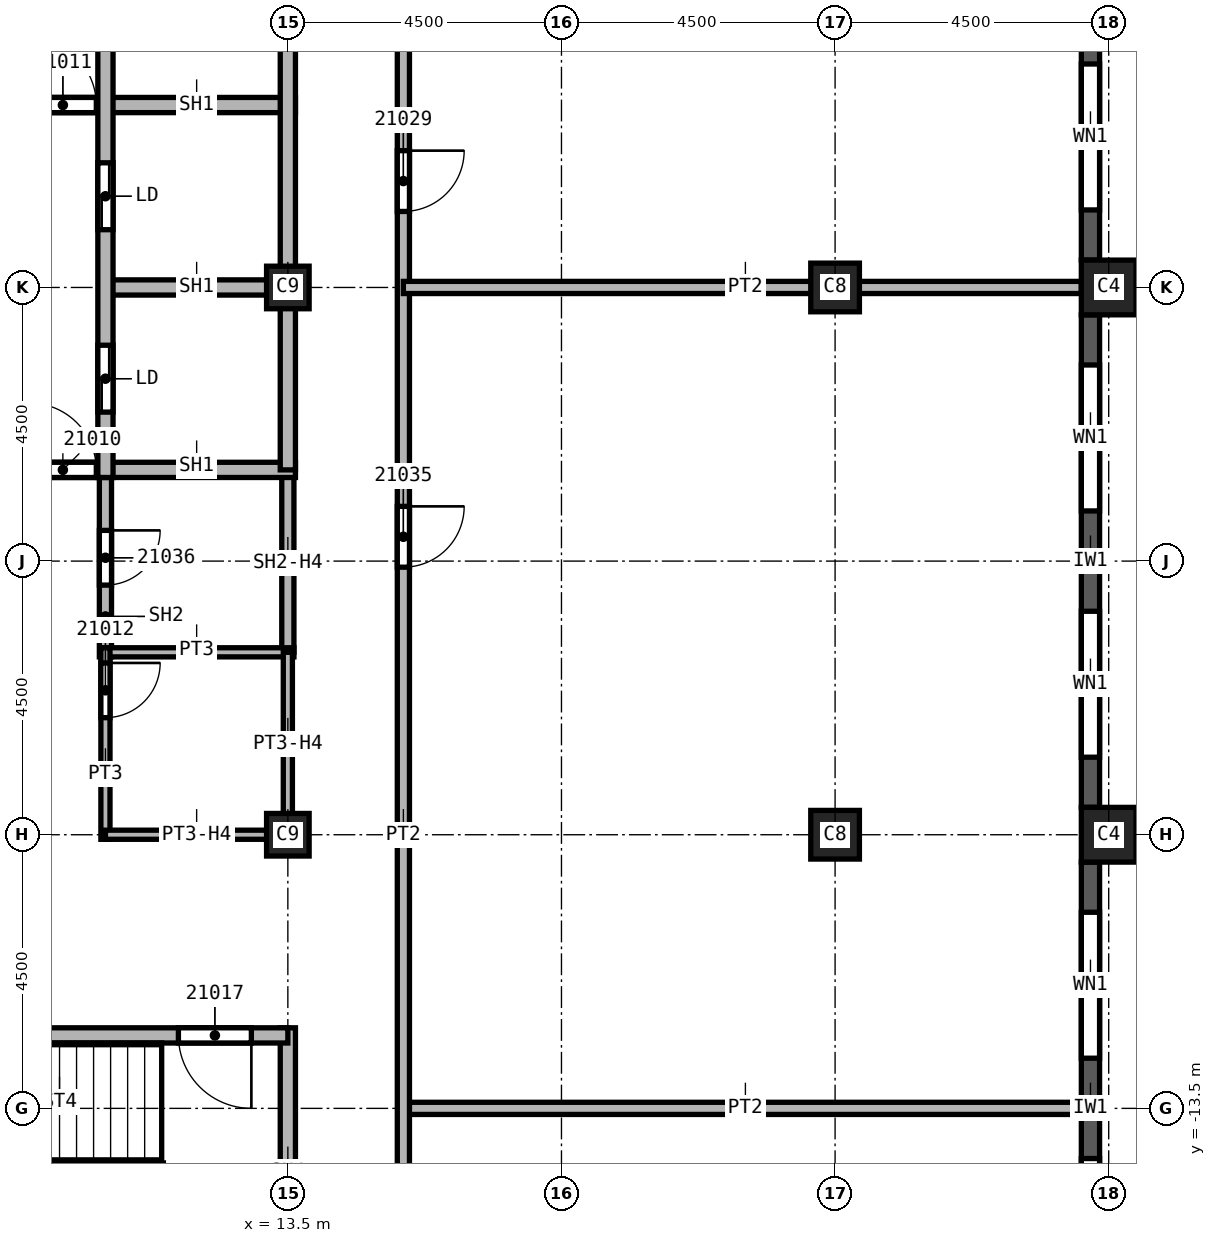
"""IFC4 building model, lengths in metres.
Left out: names, types, materials, properties, quantities, classifications, styles, units other than length and angle.
Written with IfcOpenShell. Run it as: python <this file> out.ifc"""

import sys

from ifc_helpers import new_model, si_unit, direction, frame, frame_2d, origin, origin_2d, place, context, subcontext, project, spatial, rectangle, extrude, element, fill, save


model = new_model("IFC4")
c1 = context("Model", 3, precision=1e-05, world=origin(), true_north=direction((0.0, 1.0)))
c2 = subcontext(c1, "Body", "Model", "MODEL_VIEW")
j1 = project(units=[si_unit("LENGTHUNIT", "METRE"), si_unit("PLANEANGLEUNIT", "RADIAN")], contexts=[c1])
p1 = place(None, origin())
s1 = spatial("IfcSite", under=j1, at=p1, CompositionType="ELEMENT")
p2 = place(p1, origin())
s2 = spatial("IfcBuilding", under=s1, at=p2, CompositionType="ELEMENT")
p3 = place(p2, frame((0.0, 0.0, 304.0)))
s3 = spatial("IfcBuildingStorey", under=s2, at=p3, CompositionType="ELEMENT", Elevation=304.0)
for number, where, z_axis, x_axis in (
    (1, (22.5, 0.0, 0.0), (0.0, 0.0, 1.0), (1.0, 0.0, 0.0)),
    (2, (22.5, -9.0, 0.0), (0.0, 0.0, 1.0), (1.0, 0.0, 0.0)),
):
    element("IfcColumn", number, at=place(p3, frame(where, z_axis=z_axis, x_axis=x_axis)), inside=s3, PredefinedType="COLUMN", context=c2, shape_type="SweptSolid", body=[
        extrude(rectangle(XDim=0.8, YDim=0.8, at=origin_2d()), origin(), (0.0, 0.0, 1.0), 3.74),
    ])
for number, where, z_axis, x_axis in (
    (3, (13.5, 0.0, 0.0), (0.0, 0.0, 1.0), (1.0, 0.0, 0.0)),
    (4, (13.5, -9.0, 0.0), (0.0, 0.0, 1.0), (1.0, 0.0, 0.0)),
):
    element("IfcColumn", number, at=place(p3, frame(where, z_axis=z_axis, x_axis=x_axis)), inside=s3, PredefinedType="COLUMN", context=c2, shape_type="SweptSolid", body=[
        extrude(rectangle(XDim=0.7, YDim=0.7, at=origin_2d()), origin(), (0.0, 0.0, 1.0), 3.74),
    ])
for number, where, z_axis, x_axis in (
    (5, (27.0, 0.0, 0.0), (0.0, 0.0, 1.0), (0.0, 1.0, 0.0)),
    (6, (27.0, -9.0, 0.0), (0.0, 0.0, 1.0), (0.0, 1.0, 0.0)),
):
    element("IfcColumn", number, at=place(p3, frame(where, z_axis=z_axis, x_axis=x_axis)), inside=s3, PredefinedType="COLUMN", context=c2, shape_type="SweptSolid", body=[
        extrude(rectangle(XDim=0.9, YDim=0.9, at=origin_2d()), origin(), (0.0, 0.0, 1.0), 3.74),
    ])
p4 = place(p3, frame((26.7, -17.55, 0.0), z_axis=(0.0, 0.0, 1.0), x_axis=(0.0, 1.0, 0.0)))
e7 = element("IfcWall", 7, at=p4, inside=s3, PredefinedType="SOLIDWALL", context=c2, shape_type="SweptSolid", body=[
    extrude(rectangle(XDim=8.1, YDim=0.3, at=frame_2d((4.05, 0.0))), origin(), (0.0, 0.0, 1.0), 3.14),
])
p5 = place(p4, frame((0.825, 0.0, 0.8)))
e8 = element("IfcOpeningElement", 8, at=p5, cuts=e7, PredefinedType="OPENING", context=c2, shape_type="SweptSolid", body=[
    extrude(rectangle(XDim=2.4, YDim=1.95, at=frame_2d((1.2, 0.975))), frame((0.0, 0.15, 0.0), z_axis=(0.0, -1.0, 0.0), x_axis=(1.0, 0.0, 0.0)), (0.0, 0.0, 1.0), 0.3),
])
p6 = place(p4, frame((4.875, 0.0, 0.8)))
e9 = element("IfcOpeningElement", 9, at=p6, cuts=e7, PredefinedType="OPENING", context=c2, shape_type="SweptSolid", body=[
    extrude(rectangle(XDim=2.4, YDim=1.95, at=frame_2d((1.2, 0.975))), frame((0.0, 0.15, 0.0), z_axis=(0.0, -1.0, 0.0), x_axis=(1.0, 0.0, 0.0)), (0.0, 0.0, 1.0), 0.3),
])
p7 = place(p3, frame((26.7, -8.55, 0.0), z_axis=(0.0, 0.0, 1.0), x_axis=(0.0, 1.0, 0.0)))
e10 = element("IfcWall", 10, at=p7, inside=s3, PredefinedType="SOLIDWALL", context=c2, shape_type="SweptSolid", body=[
    extrude(rectangle(XDim=8.1, YDim=0.3, at=frame_2d((4.05, 0.0))), origin(), (0.0, 0.0, 1.0), 3.14),
])
p8 = place(p7, frame((0.825, 0.0, 0.8)))
e11 = element("IfcOpeningElement", 11, at=p8, cuts=e10, PredefinedType="OPENING", context=c2, shape_type="SweptSolid", body=[
    extrude(rectangle(XDim=2.4, YDim=1.95, at=frame_2d((1.2, 0.975))), frame((0.0, 0.15, 0.0), z_axis=(0.0, -1.0, 0.0), x_axis=(1.0, 0.0, 0.0)), (0.0, 0.0, 1.0), 0.3),
])
p9 = place(p7, frame((4.875, 0.0, 0.8)))
e12 = element("IfcOpeningElement", 12, at=p9, cuts=e10, PredefinedType="OPENING", context=c2, shape_type="SweptSolid", body=[
    extrude(rectangle(XDim=2.4, YDim=1.95, at=frame_2d((1.2, 0.975))), frame((0.0, 0.15, 0.0), z_axis=(0.0, -1.0, 0.0), x_axis=(1.0, 0.0, 0.0)), (0.0, 0.0, 1.0), 0.3),
])
p10 = place(p3, frame((26.7, 0.45, 0.0), z_axis=(0.0, 0.0, 1.0), x_axis=(0.0, 1.0, 0.0)))
e13 = element("IfcWall", 13, at=p10, inside=s3, PredefinedType="SOLIDWALL", context=c2, shape_type="SweptSolid", body=[
    extrude(rectangle(XDim=8.1, YDim=0.3, at=frame_2d((4.05, 0.0))), origin(), (0.0, 0.0, 1.0), 3.14),
])
p11 = place(p10, frame((0.825, 0.0, 0.8)))
e14 = element("IfcOpeningElement", 14, at=p11, cuts=e13, PredefinedType="OPENING", context=c2, shape_type="SweptSolid", body=[
    extrude(rectangle(XDim=2.4, YDim=1.95, at=frame_2d((1.2, 0.975))), frame((0.0, 0.15, 0.0), z_axis=(0.0, -1.0, 0.0), x_axis=(1.0, 0.0, 0.0)), (0.0, 0.0, 1.0), 0.3),
])
p12 = place(p10, frame((4.875, 0.0, 0.8)))
e15 = element("IfcOpeningElement", 15, at=p12, cuts=e13, PredefinedType="OPENING", context=c2, shape_type="SweptSolid", body=[
    extrude(rectangle(XDim=2.4, YDim=1.95, at=frame_2d((1.2, 0.975))), frame((0.0, 0.15, 0.0), z_axis=(0.0, -1.0, 0.0), x_axis=(1.0, 0.0, 0.0)), (0.0, 0.0, 1.0), 0.3),
])
p13 = place(p3, frame((15.4, -13.5, 0.0), z_axis=(0.0, 0.0, 1.0), x_axis=(1.0, 0.0, 0.0)))
e16 = element("IfcWall", 16, at=p13, inside=s3, PredefinedType="PARTITIONING", context=c2, shape_type="SweptSolid", body=[
    extrude(rectangle(XDim=11.15, YDim=0.2, at=frame_2d((5.575, 0.0))), origin(), (0.0, 0.0, 1.0), 3.74),
])
p14 = place(p3, frame((15.4, 22.95, 0.0), z_axis=(0.0, 0.0, 1.0), x_axis=(0.0, -1.0, 0.0)))
e17 = element("IfcWall", 17, at=p14, inside=s3, PredefinedType="PARTITIONING", context=c2, shape_type="SweptSolid", body=[
    extrude(rectangle(XDim=45.9, YDim=0.2, at=frame_2d((22.95, 0.0))), origin(), (0.0, 0.0, 1.0), 3.74),
])
p15 = place(p14, frame((20.7, 0.0, 0.0)))
e18 = element("IfcOpeningElement", 18, at=p15, cuts=e17, PredefinedType="OPENING", context=c2, shape_type="SweptSolid", body=[
    extrude(rectangle(XDim=1.0, YDim=2.1, at=frame_2d((0.5, 1.05))), frame((0.0, 0.1, 0.0), z_axis=(0.0, -1.0, 0.0), x_axis=(1.0, 0.0, 0.0)), (0.0, 0.0, 1.0), 0.2),
])
p16 = place(p14, frame((11.85, 0.0, 0.0)))
e19 = element("IfcOpeningElement", 19, at=p16, cuts=e17, PredefinedType="OPENING", context=c2, shape_type="SweptSolid", body=[
    extrude(rectangle(XDim=1.0, YDim=2.1, at=frame_2d((0.5, 1.05))), frame((0.0, 0.1, 0.0), z_axis=(0.0, -1.0, 0.0), x_axis=(1.0, 0.0, 0.0)), (0.0, 0.0, 1.0), 0.2),
])
p17 = place(p14, frame((4.725, 0.0, 0.0)))
e20 = element("IfcOpeningElement", 20, at=p17, cuts=e17, PredefinedType="OPENING", context=c2, shape_type="SweptSolid", body=[
    extrude(rectangle(XDim=1.0, YDim=2.1, at=frame_2d((0.5, 1.05))), frame((0.0, 0.1, 0.0), z_axis=(0.0, -1.0, 0.0), x_axis=(1.0, 0.0, 0.0)), (0.0, 0.0, 1.0), 0.2),
])
p18 = place(p14, frame((0.4, 0.0, 0.0)))
e21 = element("IfcOpeningElement", 21, at=p18, cuts=e17, PredefinedType="OPENING", context=c2, shape_type="SweptSolid", body=[
    extrude(rectangle(XDim=1.0, YDim=2.1, at=frame_2d((0.5, 1.05))), frame((0.0, 0.1, 0.0), z_axis=(0.0, -1.0, 0.0), x_axis=(1.0, 0.0, 0.0)), (0.0, 0.0, 1.0), 0.2),
])
p19 = place(p14, frame((38.85, 0.0, 0.0)))
e22 = element("IfcOpeningElement", 22, at=p19, cuts=e17, PredefinedType="OPENING", context=c2, shape_type="SweptSolid", body=[
    extrude(rectangle(XDim=1.0, YDim=2.1, at=frame_2d((0.5, 1.05))), frame((0.0, 0.1, 0.0), z_axis=(0.0, -1.0, 0.0), x_axis=(1.0, 0.0, 0.0)), (0.0, 0.0, 1.0), 0.2),
])
p20 = place(p14, frame((26.55, 0.0, 0.0)))
e23 = element("IfcOpeningElement", 23, at=p20, cuts=e17, PredefinedType="OPENING", context=c2, shape_type="SweptSolid", body=[
    extrude(rectangle(XDim=1.0, YDim=2.1, at=frame_2d((0.5, 1.05))), frame((0.0, 0.1, 0.0), z_axis=(0.0, -1.0, 0.0), x_axis=(1.0, 0.0, 0.0)), (0.0, 0.0, 1.0), 0.2),
])
p21 = place(p3, frame((26.55, 0.0, 0.0), z_axis=(0.0, 0.0, 1.0), x_axis=(-1.0, 0.0, 0.0)))
e24 = element("IfcWall", 24, at=p21, inside=s3, PredefinedType="PARTITIONING", context=c2, shape_type="SweptSolid", body=[
    extrude(rectangle(XDim=11.15, YDim=0.2, at=frame_2d((5.575, 0.0))), origin(), (0.0, 0.0, 1.0), 3.74),
])
p22 = place(p3, frame((10.5, -2.875, 0.0), z_axis=(0.0, 0.0, 1.0), x_axis=(0.0, -1.0, 0.0)))
e25 = element("IfcWall", 25, at=p22, inside=s3, PredefinedType="SOLIDWALL", context=c2, shape_type="SweptSolid", body=[
    extrude(rectangle(XDim=3.2, YDim=0.2, at=frame_2d((1.6, 0.0))), origin(), (0.0, 0.0, 1.0), 3.74),
])
p23 = place(p22, frame((1.12, 0.0, 0.0)))
e26 = element("IfcOpeningElement", 26, at=p23, cuts=e25, PredefinedType="OPENING", context=c2, shape_type="SweptSolid", body=[
    extrude(rectangle(XDim=0.9, YDim=2.1, at=frame_2d((0.45, 1.05))), frame((0.0, 0.1, 0.0), z_axis=(0.0, -1.0, 0.0), x_axis=(1.0, 0.0, 0.0)), (0.0, 0.0, 1.0), 0.2),
])
p24 = place(p3, frame((13.5, -3.0, 0.0), z_axis=(0.0, 0.0, 1.0), x_axis=(0.0, -1.0, 0.0)))
e27 = element("IfcWall", 27, at=p24, inside=s3, PredefinedType="SOLIDWALL", context=c2, shape_type="SweptSolid", body=[
    extrude(rectangle(XDim=3.0, YDim=0.2, at=frame_2d((1.5, 0.0))), origin(), (0.0, 0.0, 1.0), 3.062),
])
p25 = place(p3, frame((7.5, -3.0, 0.0), z_axis=(0.0, 0.0, 1.0), x_axis=(1.0, 0.0, 0.0)))
e28 = element("IfcWall", 28, at=p25, inside=s3, PredefinedType="SOLIDWALL", context=c2, shape_type="SweptSolid", body=[
    extrude(rectangle(XDim=6.125, YDim=0.25, at=frame_2d((3.062, 0.0))), origin(), (0.0, 0.0, 1.0), 3.74),
])
p26 = place(p25, frame((1.75, 0.0, 0.0)))
e29 = element("IfcOpeningElement", 29, at=p26, cuts=e28, PredefinedType="OPENING", context=c2, shape_type="SweptSolid", body=[
    extrude(rectangle(XDim=1.1, YDim=2.1, at=frame_2d((0.55, 1.05))), frame((0.0, 0.125, 0.0), z_axis=(0.0, -1.0, 0.0), x_axis=(1.0, 0.0, 0.0)), (0.0, 0.0, 1.0), 0.25),
])
p27 = place(p3, frame((7.5, 3.0, 0.0), z_axis=(0.0, 0.0, 1.0), x_axis=(1.0, 0.0, 0.0)))
e30 = element("IfcWall", 30, at=p27, inside=s3, PredefinedType="SOLIDWALL", context=c2, shape_type="SweptSolid", body=[
    extrude(rectangle(XDim=6.125, YDim=0.25, at=frame_2d((3.062, 0.0))), origin(), (0.0, 0.0, 1.0), 3.74),
])
p28 = place(p27, frame((1.75, 0.0, 0.0)))
e31 = element("IfcOpeningElement", 31, at=p28, cuts=e30, PredefinedType="OPENING", context=c2, shape_type="SweptSolid", body=[
    extrude(rectangle(XDim=1.1, YDim=2.1, at=frame_2d((0.55, 1.05))), frame((0.0, 0.125, 0.0), z_axis=(0.0, -1.0, 0.0), x_axis=(1.0, 0.0, 0.0)), (0.0, 0.0, 1.0), 0.25),
])
p29 = place(p3, frame((10.5, 0.0, 0.0), z_axis=(0.0, 0.0, 1.0), x_axis=(1.0, 0.0, 0.0)))
e32 = element("IfcWall", 32, at=p29, inside=s3, PredefinedType="SOLIDWALL", context=c2, shape_type="SweptSolid", body=[
    extrude(rectangle(XDim=3.125, YDim=0.25, at=frame_2d((1.562, 0.0))), origin(), (0.0, 0.0, 1.0), 3.74),
])
p30 = place(p3, frame((10.5, 6.125, 0.0), z_axis=(0.0, 0.0, 1.0), x_axis=(0.0, -1.0, 0.0)))
e33 = element("IfcWall", 33, at=p30, inside=s3, PredefinedType="SOLIDWALL", context=c2, shape_type="SweptSolid", body=[
    extrude(rectangle(XDim=9.25, YDim=0.25, at=frame_2d((4.625, 0.0))), origin(), (0.0, 0.0, 1.0), 3.74),
])
p31 = place(p30, frame((7.075, 0.0, 0.0)))
e34 = element("IfcOpeningElement", 34, at=p31, cuts=e33, PredefinedType="OPENING", context=c2, shape_type="SweptSolid", body=[
    extrude(rectangle(XDim=1.1, YDim=2.1, at=frame_2d((0.55, 1.05))), frame((0.0, 0.125, 0.0), z_axis=(0.0, -1.0, 0.0), x_axis=(1.0, 0.0, 0.0)), (0.0, 0.0, 1.0), 0.25),
])
p32 = place(p30, frame((4.075, 0.0, 0.0)))
e35 = element("IfcOpeningElement", 35, at=p32, cuts=e33, PredefinedType="OPENING", context=c2, shape_type="SweptSolid", body=[
    extrude(rectangle(XDim=1.1, YDim=2.1, at=frame_2d((0.55, 1.05))), frame((0.0, 0.125, 0.0), z_axis=(0.0, -1.0, 0.0), x_axis=(1.0, 0.0, 0.0)), (0.0, 0.0, 1.0), 0.25),
])
p33 = place(p3, frame((13.5, 6.0, 0.0), z_axis=(0.0, 0.0, 1.0), x_axis=(0.0, -1.0, 0.0)))
e36 = element("IfcWall", 36, at=p33, inside=s3, PredefinedType="SOLIDWALL", context=c2, shape_type="SweptSolid", body=[
    extrude(rectangle(XDim=9.0, YDim=0.25, at=frame_2d((4.5, 0.0))), origin(), (0.0, 0.0, 1.0), 3.062),
])
p34 = place(p3, frame((13.5, -16.925, 0.0), z_axis=(0.0, 0.0, 1.0), x_axis=(0.0, 1.0, 0.0)))
e37 = element("IfcWall", 37, at=p34, inside=s3, PredefinedType="SOLIDWALL", context=c2, shape_type="SweptSolid", body=[
    extrude(rectangle(XDim=4.75, YDim=0.25, at=frame_2d((2.375, 0.0))), origin(), (0.0, 0.0, 1.0), 3.74),
])
p35 = place(p3, frame((13.5, -12.3, 0.0), z_axis=(0.0, 0.0, 1.0), x_axis=(-1.0, 0.0, 0.0)))
e38 = element("IfcWall", 38, at=p35, inside=s3, PredefinedType="SOLIDWALL", context=c2, shape_type="SweptSolid", body=[
    extrude(rectangle(XDim=9.125, YDim=0.25, at=frame_2d((4.562, 0.0))), origin(), (0.0, 0.0, 1.0), 3.74),
])
p36 = place(p35, frame((0.6, 0.0, 0.0)))
e39 = element("IfcOpeningElement", 39, at=p36, cuts=e38, PredefinedType="OPENING", context=c2, shape_type="SweptSolid", body=[
    extrude(rectangle(XDim=1.2, YDim=2.1, at=frame_2d((0.6, 1.05))), frame((0.0, 0.125, 0.0), z_axis=(0.0, -1.0, 0.0), x_axis=(1.0, 0.0, 0.0)), (0.0, 0.0, 1.0), 0.25),
])
p37 = place(p3, frame((10.5, -6.0, 0.0), z_axis=(0.0, 0.0, 1.0), x_axis=(1.0, 0.0, 0.0)))
e40 = element("IfcWall", 40, at=p37, inside=s3, PredefinedType="PARTITIONING", context=c2, shape_type="SweptSolid", body=[
    extrude(rectangle(XDim=3.1, YDim=0.15, at=frame_2d((1.55, 0.0))), origin(), (0.0, 0.0, 1.0), 3.74),
])
p38 = place(p3, frame((10.5, -5.925, 0.0), z_axis=(0.0, 0.0, 1.0), x_axis=(0.0, -1.0, 0.0)))
e41 = element("IfcWall", 41, at=p38, inside=s3, PredefinedType="PARTITIONING", context=c2, shape_type="SweptSolid", body=[
    extrude(rectangle(XDim=3.15, YDim=0.15, at=frame_2d((1.575, 0.0))), origin(), (0.0, 0.0, 1.0), 3.74),
])
p39 = place(p38, frame((0.25, 0.0, 0.0)))
e42 = element("IfcOpeningElement", 42, at=p39, cuts=e41, PredefinedType="OPENING", context=c2, shape_type="SweptSolid", body=[
    extrude(rectangle(XDim=0.9, YDim=2.1, at=frame_2d((0.45, 1.05))), frame((0.0, 0.075, 0.0), z_axis=(0.0, -1.0, 0.0), x_axis=(1.0, 0.0, 0.0)), (0.0, 0.0, 1.0), 0.15),
])
p40 = place(p3, frame((13.5, -9.0, 0.0), z_axis=(0.0, 0.0, 1.0), x_axis=(-1.0, 0.0, 0.0)))
e43 = element("IfcWall", 43, at=p40, inside=s3, PredefinedType="PARTITIONING", context=c2, shape_type="SweptSolid", body=[
    extrude(rectangle(XDim=3.0, YDim=0.15, at=frame_2d((1.5, 0.0))), origin(), (0.0, 0.0, 1.0), 3.062),
])
p41 = place(p3, frame((13.5, -6.0, 0.0), z_axis=(0.0, 0.0, 1.0), x_axis=(0.0, -1.0, 0.0)))
e44 = element("IfcWall", 44, at=p41, inside=s3, PredefinedType="PARTITIONING", context=c2, shape_type="SweptSolid", body=[
    extrude(rectangle(XDim=3.075, YDim=0.15, at=frame_2d((1.538, 0.0))), origin(), (0.0, 0.0, 1.0), 3.062),
])
p42 = place(p5, origin())
e45 = element("IfcWindow", 45, at=p42, inside=s3, PartitioningType="SINGLE_PANEL", PredefinedType="WINDOW", context=c2, shape_type="SweptSolid", body=[
    extrude(rectangle(XDim=2.4, YDim=1.95, at=frame_2d((1.2, 0.975))), frame((0.0, 0.03, 0.0), z_axis=(0.0, -1.0, 0.0), x_axis=(1.0, 0.0, 0.0)), (0.0, 0.0, 1.0), 0.06),
])
fill(e8, e45)
p43 = place(p6, origin())
e46 = element("IfcWindow", 46, at=p43, inside=s3, PartitioningType="SINGLE_PANEL", PredefinedType="WINDOW", context=c2, shape_type="SweptSolid", body=[
    extrude(rectangle(XDim=2.4, YDim=1.95, at=frame_2d((1.2, 0.975))), frame((0.0, 0.03, 0.0), z_axis=(0.0, -1.0, 0.0), x_axis=(1.0, 0.0, 0.0)), (0.0, 0.0, 1.0), 0.06),
])
fill(e9, e46)
p44 = place(p8, origin())
e47 = element("IfcWindow", 47, at=p44, inside=s3, PartitioningType="SINGLE_PANEL", PredefinedType="WINDOW", context=c2, shape_type="SweptSolid", body=[
    extrude(rectangle(XDim=2.4, YDim=1.95, at=frame_2d((1.2, 0.975))), frame((0.0, 0.03, 0.0), z_axis=(0.0, -1.0, 0.0), x_axis=(1.0, 0.0, 0.0)), (0.0, 0.0, 1.0), 0.06),
])
fill(e11, e47)
p45 = place(p9, origin())
e48 = element("IfcWindow", 48, at=p45, inside=s3, PartitioningType="SINGLE_PANEL", PredefinedType="WINDOW", context=c2, shape_type="SweptSolid", body=[
    extrude(rectangle(XDim=2.4, YDim=1.95, at=frame_2d((1.2, 0.975))), frame((0.0, 0.03, 0.0), z_axis=(0.0, -1.0, 0.0), x_axis=(1.0, 0.0, 0.0)), (0.0, 0.0, 1.0), 0.06),
])
fill(e12, e48)
p46 = place(p11, origin())
e49 = element("IfcWindow", 49, at=p46, inside=s3, PartitioningType="SINGLE_PANEL", PredefinedType="WINDOW", context=c2, shape_type="SweptSolid", body=[
    extrude(rectangle(XDim=2.4, YDim=1.95, at=frame_2d((1.2, 0.975))), frame((0.0, 0.03, 0.0), z_axis=(0.0, -1.0, 0.0), x_axis=(1.0, 0.0, 0.0)), (0.0, 0.0, 1.0), 0.06),
])
fill(e14, e49)
p47 = place(p26, origin())
e50 = element("IfcDoor", 50, at=p47, inside=s3, OperationType="SINGLE_SWING_LEFT", PredefinedType="DOOR", context=c2, shape_type="SweptSolid", body=[
    extrude(rectangle(XDim=1.1, YDim=2.1, at=frame_2d((0.55, 1.05))), frame((0.0, 0.025, 0.0), z_axis=(0.0, -1.0, 0.0), x_axis=(1.0, 0.0, 0.0)), (0.0, 0.0, 1.0), 0.05),
])
fill(e29, e50)
p48 = place(p28, origin())
e51 = element("IfcDoor", 51, at=p48, inside=s3, OperationType="SINGLE_SWING_RIGHT", PredefinedType="DOOR", context=c2, shape_type="SweptSolid", body=[
    extrude(rectangle(XDim=1.1, YDim=2.1, at=frame_2d((0.55, 1.05))), frame((0.0, 0.025, 0.0), z_axis=(0.0, -1.0, 0.0), x_axis=(1.0, 0.0, 0.0)), (0.0, 0.0, 1.0), 0.05),
])
fill(e31, e51)
p49 = place(p39, origin())
e52 = element("IfcDoor", 52, at=p49, inside=s3, OperationType="SINGLE_SWING_LEFT", PredefinedType="DOOR", context=c2, shape_type="SweptSolid", body=[
    extrude(rectangle(XDim=0.9, YDim=2.1, at=frame_2d((0.45, 1.05))), frame((0.0, 0.025, 0.0), z_axis=(0.0, -1.0, 0.0), x_axis=(1.0, 0.0, 0.0)), (0.0, 0.0, 1.0), 0.05),
])
fill(e42, e52)
p50 = place(p36, origin())
e53 = element("IfcDoor", 53, at=p50, inside=s3, OperationType="SINGLE_SWING_RIGHT", PredefinedType="DOOR", context=c2, shape_type="SweptSolid", body=[
    extrude(rectangle(XDim=1.2, YDim=2.1, at=frame_2d((0.6, 1.05))), frame((0.0, 0.025, 0.0), z_axis=(0.0, -1.0, 0.0), x_axis=(1.0, 0.0, 0.0)), (0.0, 0.0, 1.0), 0.05),
])
fill(e39, e53)
p51 = place(p15, origin())
e54 = element("IfcDoor", 54, at=p51, inside=s3, OperationType="SINGLE_SWING_RIGHT", PredefinedType="DOOR", context=c2, shape_type="SweptSolid", body=[
    extrude(rectangle(XDim=1.0, YDim=2.1, at=frame_2d((0.5, 1.05))), frame((0.0, 0.025, 0.0), z_axis=(0.0, -1.0, 0.0), x_axis=(1.0, 0.0, 0.0)), (0.0, 0.0, 1.0), 0.05),
])
fill(e18, e54)
p52 = place(p20, origin())
e55 = element("IfcDoor", 55, at=p52, inside=s3, OperationType="SINGLE_SWING_RIGHT", PredefinedType="DOOR", context=c2, shape_type="SweptSolid", body=[
    extrude(rectangle(XDim=1.0, YDim=2.1, at=frame_2d((0.5, 1.05))), frame((0.0, 0.025, 0.0), z_axis=(0.0, -1.0, 0.0), x_axis=(1.0, 0.0, 0.0)), (0.0, 0.0, 1.0), 0.05),
])
fill(e23, e55)
p53 = place(p23, origin())
e56 = element("IfcDoor", 56, at=p53, inside=s3, OperationType="SINGLE_SWING_LEFT", PredefinedType="DOOR", context=c2, shape_type="SweptSolid", body=[
    extrude(rectangle(XDim=0.9, YDim=2.1, at=frame_2d((0.45, 1.05))), frame((0.0, 0.025, 0.0), z_axis=(0.0, -1.0, 0.0), x_axis=(1.0, 0.0, 0.0)), (0.0, 0.0, 1.0), 0.05),
])
fill(e26, e56)
p54 = place(p31, origin())
e57 = element("IfcDoor", 57, at=p54, inside=s3, OperationType="SLIDING_TO_LEFT", PredefinedType="DOOR", context=c2, shape_type="SweptSolid", body=[
    extrude(rectangle(XDim=1.1, YDim=2.1, at=frame_2d((0.55, 1.05))), frame((0.0, 0.025, 0.0), z_axis=(0.0, -1.0, 0.0), x_axis=(1.0, 0.0, 0.0)), (0.0, 0.0, 1.0), 0.05),
])
fill(e34, e57)
p55 = place(p32, origin())
e58 = element("IfcDoor", 58, at=p55, inside=s3, OperationType="SLIDING_TO_LEFT", PredefinedType="DOOR", context=c2, shape_type="SweptSolid", body=[
    extrude(rectangle(XDim=1.1, YDim=2.1, at=frame_2d((0.55, 1.05))), frame((0.0, 0.025, 0.0), z_axis=(0.0, -1.0, 0.0), x_axis=(1.0, 0.0, 0.0)), (0.0, 0.0, 1.0), 0.05),
])
fill(e35, e58)
save(model, sys.argv[1])
